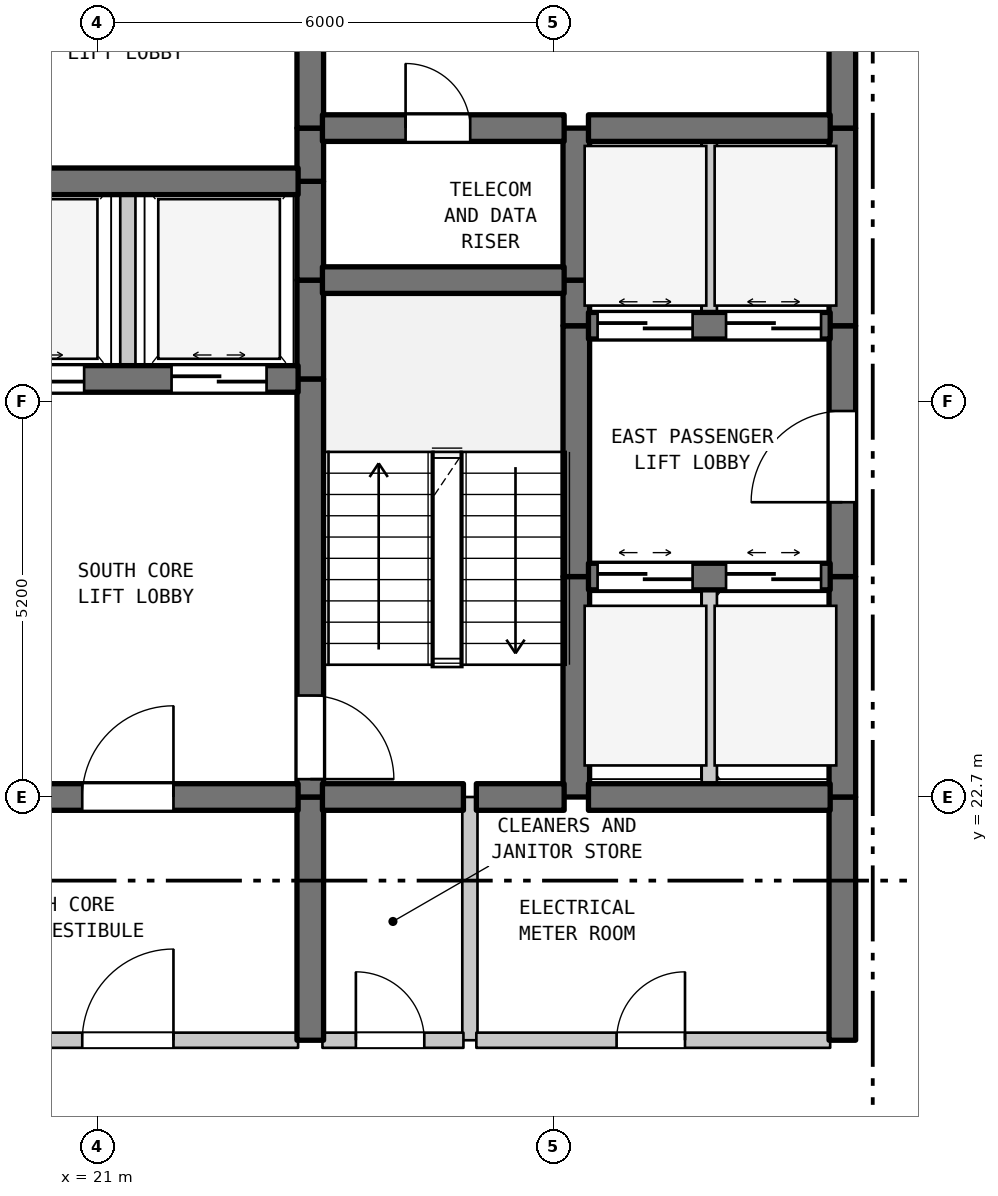
"""IFC4 building model, lengths in metres.
Left out: names, types, materials, properties, quantities, classifications, styles, units other than length and angle.
Written with IfcOpenShell. Run it as: python <this file> out.ifc"""

import sys

from ifc_helpers import new_model, si_unit, direction, frame, frame_2d, origin, place, context, subcontext, project, spatial, rectangle, extrude, element, fill, save


model = new_model("IFC4")
c1 = context("Model", 3, precision=1e-05, world=origin(), true_north=direction((0.0, 1.0)))
c2 = subcontext(c1, "Body", "Model", "MODEL_VIEW")
j1 = project(units=[si_unit("LENGTHUNIT", "METRE"), si_unit("PLANEANGLEUNIT", "RADIAN")], contexts=[c1])
p1 = place(None, origin())
s1 = spatial("IfcSite", under=j1, at=p1, CompositionType="ELEMENT")
p2 = place(p1, origin())
s2 = spatial("IfcBuilding", under=s1, at=p2, CompositionType="ELEMENT")
p3 = place(p2, frame((0.0, 0.0, 169.1)))
s3 = spatial("IfcBuildingStorey", under=s2, at=p3, CompositionType="ELEMENT", Elevation=169.1)
p4 = place(p3, frame((21.4, 28.2, 0.0), z_axis=(0.0, 0.0, 1.0), x_axis=(0.0, 1.0, 0.0)))
e1 = element("IfcWall", 1, at=p4, inside=s3, PredefinedType="STANDARD", context=c2, shape_type="SweptSolid", body=[
    extrude(rectangle(XDim=2.6, YDim=0.2, at=frame_2d((1.3, 0.0))), origin(), (0.0, 0.0, 1.0), 3.39),
])
p5 = place(p3, frame((23.8, 19.5, 0.0), z_axis=(0.0, 0.0, 1.0), x_axis=(0.0, 1.0, 0.0)))
e2 = element("IfcWall", 2, at=p5, inside=s3, PredefinedType="SHEAR", context=c2, shape_type="SweptSolid", body=[
    extrude(rectangle(XDim=3.2, YDim=0.35, at=frame_2d((1.6, 0.0))), origin(), (0.0, 0.0, 1.0), 3.39),
])
p6 = place(p3, frame((23.8, 22.7, 0.0), z_axis=(0.0, 0.0, 1.0), x_axis=(0.0, 1.0, 0.0)))
e3 = element("IfcWall", 3, at=p6, inside=s3, PredefinedType="SHEAR", context=c2, shape_type="SweptSolid", body=[
    extrude(rectangle(XDim=5.5, YDim=0.35, at=frame_2d((2.75, 0.0))), origin(), (0.0, 0.0, 1.0), 3.39),
])
p7 = place(p6, frame((0.235, 0.0, 0.0)))
e4 = element("IfcOpeningElement", 4, at=p7, cuts=e3, PredefinedType="OPENING", context=c2, shape_type="SweptSolid", body=[
    extrude(rectangle(XDim=1.1, YDim=2.15, at=frame_2d((0.55, 1.075))), frame((0.0, 0.185, 0.0), z_axis=(0.0, -1.0, 0.0), x_axis=(1.0, 0.0, 0.0)), (0.0, 0.0, 1.0), 0.37),
])
for number, where, z_axis, x_axis in (
    (5, (23.8, 28.2, 0.0), (0.0, 0.0, 1.0), (0.0, 1.0, 0.0)),
    (6, (23.8, 29.5, 0.0), (0.0, 0.0, 1.0), (0.0, 1.0, 0.0)),
):
    element("IfcWall", number, at=place(p3, frame(where, z_axis=z_axis, x_axis=x_axis)), inside=s3, PredefinedType="SHEAR", context=c2, shape_type="SweptSolid", body=[
        extrude(rectangle(XDim=1.3, YDim=0.35, at=frame_2d((0.65, 0.0))), origin(), (0.0, 0.0, 1.0), 3.39),
    ])
p8 = place(p3, frame((23.8, 30.8, 0.0), z_axis=(0.0, 0.0, 1.0), x_axis=(0.0, 1.0, 0.0)))
e7 = element("IfcWall", 7, at=p8, inside=s3, PredefinedType="SHEAR", context=c2, shape_type="SweptSolid", body=[
    extrude(rectangle(XDim=0.7, YDim=0.35, at=frame_2d((0.35, 0.0))), origin(), (0.0, 0.0, 1.0), 3.39),
])
p9 = place(p3, frame((23.8, 31.5, 0.0), z_axis=(0.0, 0.0, 1.0), x_axis=(0.0, 1.0, 0.0)))
e8 = element("IfcWall", 8, at=p9, inside=s3, PredefinedType="SHEAR", context=c2, shape_type="SweptSolid", body=[
    extrude(rectangle(XDim=3.5, YDim=0.35, at=frame_2d((1.75, 0.0))), origin(), (0.0, 0.0, 1.0), 3.39),
])
p10 = place(p9, frame((1.127, 0.0, 0.0)))
e9 = element("IfcOpeningElement", 9, at=p10, cuts=e8, PredefinedType="OPENING", context=c2, shape_type="SweptSolid", body=[
    extrude(rectangle(XDim=1.1, YDim=2.15, at=frame_2d((0.55, 1.075))), frame((0.0, 0.185, 0.0), z_axis=(0.0, -1.0, 0.0), x_axis=(1.0, 0.0, 0.0)), (0.0, 0.0, 1.0), 0.37),
])
p11 = place(p3, frame((25.9, 19.5, 0.0), z_axis=(0.0, 0.0, 1.0), x_axis=(0.0, 1.0, 0.0)))
e10 = element("IfcWall", 10, at=p11, inside=s3, PredefinedType="STANDARD", context=c2, shape_type="SweptSolid", body=[
    extrude(rectangle(XDim=3.2, YDim=0.2, at=frame_2d((1.6, 0.0))), origin(), (0.0, 0.0, 1.0), 3.39),
])
p12 = place(p3, frame((27.3, 22.7, 0.0), z_axis=(0.0, 0.0, 1.0), x_axis=(0.0, 1.0, 0.0)))
e11 = element("IfcWall", 11, at=p12, inside=s3, PredefinedType="SHEAR", context=c2, shape_type="SweptSolid", body=[
    extrude(rectangle(XDim=2.9, YDim=0.35, at=frame_2d((1.45, 0.0))), origin(), (0.0, 0.0, 1.0), 3.39),
])
p13 = place(p3, frame((27.3, 25.6, 0.0), z_axis=(0.0, 0.0, 1.0), x_axis=(0.0, 1.0, 0.0)))
e12 = element("IfcWall", 12, at=p13, inside=s3, PredefinedType="SHEAR", context=c2, shape_type="SweptSolid", body=[
    extrude(rectangle(XDim=3.3, YDim=0.35, at=frame_2d((1.65, 0.0))), origin(), (0.0, 0.0, 1.0), 3.39),
])
p14 = place(p3, frame((27.3, 28.9, 0.0), z_axis=(0.0, 0.0, 1.0), x_axis=(0.0, 1.0, 0.0)))
e13 = element("IfcWall", 13, at=p14, inside=s3, PredefinedType="SHEAR", context=c2, shape_type="SweptSolid", body=[
    extrude(rectangle(XDim=0.6, YDim=0.35, at=frame_2d((0.3, 0.0))), origin(), (0.0, 0.0, 1.0), 3.39),
])
p15 = place(p3, frame((27.3, 29.5, 0.0), z_axis=(0.0, 0.0, 1.0), x_axis=(0.0, 1.0, 0.0)))
e14 = element("IfcWall", 14, at=p15, inside=s3, PredefinedType="SHEAR", context=c2, shape_type="SweptSolid", body=[
    extrude(rectangle(XDim=2.0, YDim=0.35, at=frame_2d((1.0, 0.0))), origin(), (0.0, 0.0, 1.0), 3.39),
])
p16 = place(p3, frame((29.05, 22.7, 0.0), z_axis=(0.0, 0.0, 1.0), x_axis=(0.0, 1.0, 0.0)))
e15 = element("IfcWall", 15, at=p16, inside=s3, PredefinedType="STANDARD", context=c2, shape_type="SweptSolid", body=[
    extrude(rectangle(XDim=2.9, YDim=0.2, at=frame_2d((1.45, 0.0))), origin(), (0.0, 0.0, 1.0), 3.39),
])
p17 = place(p3, frame((29.05, 28.9, 0.0), z_axis=(0.0, 0.0, 1.0), x_axis=(0.0, 1.0, 0.0)))
e16 = element("IfcWall", 16, at=p17, inside=s3, PredefinedType="STANDARD", context=c2, shape_type="SweptSolid", body=[
    extrude(rectangle(XDim=2.6, YDim=0.2, at=frame_2d((1.3, 0.0))), origin(), (0.0, 0.0, 1.0), 3.39),
])
p18 = place(p3, frame((30.8, 19.5, 0.0), z_axis=(0.0, 0.0, 1.0), x_axis=(0.0, 1.0, 0.0)))
e17 = element("IfcWall", 17, at=p18, inside=s3, PredefinedType="SHEAR", context=c2, shape_type="SweptSolid", body=[
    extrude(rectangle(XDim=3.2, YDim=0.35, at=frame_2d((1.6, 0.0))), origin(), (0.0, 0.0, 1.0), 3.39),
])
p19 = place(p3, frame((30.8, 22.7, 0.0), z_axis=(0.0, 0.0, 1.0), x_axis=(0.0, 1.0, 0.0)))
e18 = element("IfcWall", 18, at=p19, inside=s3, PredefinedType="SHEAR", context=c2, shape_type="SweptSolid", body=[
    extrude(rectangle(XDim=2.9, YDim=0.35, at=frame_2d((1.45, 0.0))), origin(), (0.0, 0.0, 1.0), 3.39),
])
p20 = place(p3, frame((30.8, 25.6, 0.0), z_axis=(0.0, 0.0, 1.0), x_axis=(0.0, 1.0, 0.0)))
e19 = element("IfcWall", 19, at=p20, inside=s3, PredefinedType="SHEAR", context=c2, shape_type="SweptSolid", body=[
    extrude(rectangle(XDim=3.3, YDim=0.35, at=frame_2d((1.65, 0.0))), origin(), (0.0, 0.0, 1.0), 3.39),
])
p21 = place(p20, frame((0.978, 0.0, 0.0)))
e20 = element("IfcOpeningElement", 20, at=p21, cuts=e19, PredefinedType="OPENING", context=c2, shape_type="SweptSolid", body=[
    extrude(rectangle(XDim=1.2, YDim=2.2, at=frame_2d((0.6, 1.1))), frame((0.0, 0.185, 0.0), z_axis=(0.0, -1.0, 0.0), x_axis=(1.0, 0.0, 0.0)), (0.0, 0.0, 1.0), 0.37),
])
p22 = place(p3, frame((30.8, 28.9, 0.0), z_axis=(0.0, 0.0, 1.0), x_axis=(0.0, 1.0, 0.0)))
e21 = element("IfcWall", 21, at=p22, inside=s3, PredefinedType="SHEAR", context=c2, shape_type="SweptSolid", body=[
    extrude(rectangle(XDim=2.6, YDim=0.35, at=frame_2d((1.3, 0.0))), origin(), (0.0, 0.0, 1.0), 3.39),
])
p23 = place(p3, frame((30.8, 31.5, 0.0), z_axis=(0.0, 0.0, 1.0), x_axis=(0.0, 1.0, 0.0)))
e22 = element("IfcWall", 22, at=p23, inside=s3, PredefinedType="SHEAR", context=c2, shape_type="SweptSolid", body=[
    extrude(rectangle(XDim=3.5, YDim=0.35, at=frame_2d((1.75, 0.0))), origin(), (0.0, 0.0, 1.0), 3.39),
])
p24 = place(p23, frame((1.15, 0.0, 0.0)))
e23 = element("IfcOpeningElement", 23, at=p24, cuts=e22, PredefinedType="OPENING", context=c2, shape_type="SweptSolid", body=[
    extrude(rectangle(XDim=1.2, YDim=2.2, at=frame_2d((0.6, 1.1))), frame((0.0, 0.185, 0.0), z_axis=(0.0, -1.0, 0.0), x_axis=(1.0, 0.0, 0.0)), (0.0, 0.0, 1.0), 0.37),
])
p25 = place(p3, frame((19.16, 19.5, 0.0), z_axis=(0.0, 0.0, 1.0), x_axis=(1.0, 0.0, 0.0)))
e24 = element("IfcWall", 24, at=p25, inside=s3, PredefinedType="STANDARD", context=c2, shape_type="SweptSolid", body=[
    extrude(rectangle(XDim=4.48, YDim=0.2, at=frame_2d((2.24, 0.0))), origin(), (0.0, 0.0, 1.0), 3.39),
])
p26 = place(p25, frame((1.64, 0.0, 0.0)))
e25 = element("IfcOpeningElement", 25, at=p26, cuts=e24, PredefinedType="OPENING", context=c2, shape_type="SweptSolid", body=[
    extrude(rectangle(XDim=1.2, YDim=2.2, at=frame_2d((0.6, 1.1))), frame((0.0, 0.11, 0.0), z_axis=(0.0, -1.0, 0.0), x_axis=(1.0, 0.0, 0.0)), (0.0, 0.0, 1.0), 0.22),
])
p27 = place(p3, frame((23.96, 19.5, 0.0), z_axis=(0.0, 0.0, 1.0), x_axis=(1.0, 0.0, 0.0)))
e26 = element("IfcWall", 26, at=p27, inside=s3, PredefinedType="STANDARD", context=c2, shape_type="SweptSolid", body=[
    extrude(rectangle(XDim=1.855, YDim=0.2, at=frame_2d((0.927, 0.0))), origin(), (0.0, 0.0, 1.0), 3.39),
])
p28 = place(p27, frame((0.44, 0.0, 0.0)))
e27 = element("IfcOpeningElement", 27, at=p28, cuts=e26, PredefinedType="OPENING", context=c2, shape_type="SweptSolid", body=[
    extrude(rectangle(XDim=0.9, YDim=2.15, at=frame_2d((0.45, 1.075))), frame((0.0, 0.11, 0.0), z_axis=(0.0, -1.0, 0.0), x_axis=(1.0, 0.0, 0.0)), (0.0, 0.0, 1.0), 0.22),
])
p29 = place(p3, frame((25.985, 19.5, 0.0), z_axis=(0.0, 0.0, 1.0), x_axis=(1.0, 0.0, 0.0)))
e28 = element("IfcWall", 28, at=p29, inside=s3, PredefinedType="STANDARD", context=c2, shape_type="SweptSolid", body=[
    extrude(rectangle(XDim=4.655, YDim=0.2, at=frame_2d((2.327, 0.0))), origin(), (0.0, 0.0, 1.0), 3.39),
])
p30 = place(p29, frame((1.845, 0.0, 0.0)))
e29 = element("IfcOpeningElement", 29, at=p30, cuts=e28, PredefinedType="OPENING", context=c2, shape_type="SweptSolid", body=[
    extrude(rectangle(XDim=0.9, YDim=2.15, at=frame_2d((0.45, 1.075))), frame((0.0, 0.11, 0.0), z_axis=(0.0, -1.0, 0.0), x_axis=(1.0, 0.0, 0.0)), (0.0, 0.0, 1.0), 0.22),
])
p31 = place(p3, frame((19.16, 22.7, 0.0), z_axis=(0.0, 0.0, 1.0), x_axis=(1.0, 0.0, 0.0)))
e30 = element("IfcWall", 30, at=p31, inside=s3, PredefinedType="SHEAR", context=c2, shape_type="SweptSolid", body=[
    extrude(rectangle(XDim=4.48, YDim=0.35, at=frame_2d((2.24, 0.0))), origin(), (0.0, 0.0, 1.0), 3.39),
])
p32 = place(p31, frame((1.64, 0.0, 0.0)))
e31 = element("IfcOpeningElement", 31, at=p32, cuts=e30, PredefinedType="OPENING", context=c2, shape_type="SweptSolid", body=[
    extrude(rectangle(XDim=1.2, YDim=2.2, at=frame_2d((0.6, 1.1))), frame((0.0, 0.185, 0.0), z_axis=(0.0, -1.0, 0.0), x_axis=(1.0, 0.0, 0.0)), (0.0, 0.0, 1.0), 0.37),
])
p33 = place(p3, frame((23.96, 22.7, 0.0), z_axis=(0.0, 0.0, 1.0), x_axis=(1.0, 0.0, 0.0)))
e32 = element("IfcWall", 32, at=p33, inside=s3, PredefinedType="SHEAR", context=c2, shape_type="SweptSolid", body=[
    extrude(rectangle(XDim=1.855, YDim=0.35, at=frame_2d((0.927, 0.0))), origin(), (0.0, 0.0, 1.0), 3.39),
])
p34 = place(p3, frame((25.985, 22.7, 0.0), z_axis=(0.0, 0.0, 1.0), x_axis=(1.0, 0.0, 0.0)))
e33 = element("IfcWall", 33, at=p34, inside=s3, PredefinedType="SHEAR", context=c2, shape_type="SweptSolid", body=[
    extrude(rectangle(XDim=1.155, YDim=0.35, at=frame_2d((0.577, 0.0))), origin(), (0.0, 0.0, 1.0), 3.39),
])
p35 = place(p3, frame((27.46, 22.7, 0.0), z_axis=(0.0, 0.0, 1.0), x_axis=(1.0, 0.0, 0.0)))
e34 = element("IfcWall", 34, at=p35, inside=s3, PredefinedType="SHEAR", context=c2, shape_type="SweptSolid", body=[
    extrude(rectangle(XDim=3.18, YDim=0.35, at=frame_2d((1.59, 0.0))), origin(), (0.0, 0.0, 1.0), 3.39),
])
p36 = place(p3, frame((27.46, 25.6, 0.0), z_axis=(0.0, 0.0, 1.0), x_axis=(1.0, 0.0, 0.0)))
e35 = element("IfcWall", 35, at=p36, inside=s3, PredefinedType="SHEAR", context=c2, shape_type="SweptSolid", body=[
    extrude(rectangle(XDim=3.18, YDim=0.35, at=frame_2d((1.59, 0.0))), origin(), (0.0, 0.0, 1.0), 3.39),
])
p37 = place(p36, frame((0.12, 0.0, 0.0)))
e36 = element("IfcOpeningElement", 36, at=p37, cuts=e35, PredefinedType="OPENING", context=c2, shape_type="SweptSolid", body=[
    extrude(rectangle(XDim=1.25, YDim=2.2, at=frame_2d((0.625, 1.1))), frame((0.0, 0.185, 0.0), z_axis=(0.0, -1.0, 0.0), x_axis=(1.0, 0.0, 0.0)), (0.0, 0.0, 1.0), 0.37),
])
p38 = place(p36, frame((1.81, 0.0, 0.0)))
e37 = element("IfcOpeningElement", 37, at=p38, cuts=e35, PredefinedType="OPENING", context=c2, shape_type="SweptSolid", body=[
    extrude(rectangle(XDim=1.25, YDim=2.2, at=frame_2d((0.625, 1.1))), frame((0.0, 0.185, 0.0), z_axis=(0.0, -1.0, 0.0), x_axis=(1.0, 0.0, 0.0)), (0.0, 0.0, 1.0), 0.37),
])
p39 = place(p3, frame((19.16, 28.2, 0.0), z_axis=(0.0, 0.0, 1.0), x_axis=(1.0, 0.0, 0.0)))
e38 = element("IfcWall", 38, at=p39, inside=s3, PredefinedType="SHEAR", context=c2, shape_type="SweptSolid", body=[
    extrude(rectangle(XDim=4.48, YDim=0.35, at=frame_2d((2.24, 0.0))), origin(), (0.0, 0.0, 1.0), 3.39),
])
p40 = place(p39, frame((0.415, 0.0, 0.0)))
e39 = element("IfcOpeningElement", 39, at=p40, cuts=e38, PredefinedType="OPENING", context=c2, shape_type="SweptSolid", body=[
    extrude(rectangle(XDim=1.25, YDim=2.2, at=frame_2d((0.625, 1.1))), frame((0.0, 0.185, 0.0), z_axis=(0.0, -1.0, 0.0), x_axis=(1.0, 0.0, 0.0)), (0.0, 0.0, 1.0), 0.37),
])
p41 = place(p39, frame((2.815, 0.0, 0.0)))
e40 = element("IfcOpeningElement", 40, at=p41, cuts=e38, PredefinedType="OPENING", context=c2, shape_type="SweptSolid", body=[
    extrude(rectangle(XDim=1.25, YDim=2.2, at=frame_2d((0.625, 1.1))), frame((0.0, 0.185, 0.0), z_axis=(0.0, -1.0, 0.0), x_axis=(1.0, 0.0, 0.0)), (0.0, 0.0, 1.0), 0.37),
])
p42 = place(p3, frame((27.46, 28.9, 0.0), z_axis=(0.0, 0.0, 1.0), x_axis=(1.0, 0.0, 0.0)))
e41 = element("IfcWall", 41, at=p42, inside=s3, PredefinedType="SHEAR", context=c2, shape_type="SweptSolid", body=[
    extrude(rectangle(XDim=3.18, YDim=0.35, at=frame_2d((1.59, 0.0))), origin(), (0.0, 0.0, 1.0), 3.39),
])
p43 = place(p42, frame((0.12, 0.0, 0.0)))
e42 = element("IfcOpeningElement", 42, at=p43, cuts=e41, PredefinedType="OPENING", context=c2, shape_type="SweptSolid", body=[
    extrude(rectangle(XDim=1.25, YDim=2.2, at=frame_2d((0.625, 1.1))), frame((0.0, 0.185, 0.0), z_axis=(0.0, -1.0, 0.0), x_axis=(1.0, 0.0, 0.0)), (0.0, 0.0, 1.0), 0.37),
])
p44 = place(p42, frame((1.81, 0.0, 0.0)))
e43 = element("IfcOpeningElement", 43, at=p44, cuts=e41, PredefinedType="OPENING", context=c2, shape_type="SweptSolid", body=[
    extrude(rectangle(XDim=1.25, YDim=2.2, at=frame_2d((0.625, 1.1))), frame((0.0, 0.185, 0.0), z_axis=(0.0, -1.0, 0.0), x_axis=(1.0, 0.0, 0.0)), (0.0, 0.0, 1.0), 0.37),
])
p45 = place(p3, frame((23.96, 29.5, 0.0), z_axis=(0.0, 0.0, 1.0), x_axis=(1.0, 0.0, 0.0)))
e44 = element("IfcWall", 44, at=p45, inside=s3, PredefinedType="SHEAR", context=c2, shape_type="SweptSolid", body=[
    extrude(rectangle(XDim=3.18, YDim=0.35, at=frame_2d((1.59, 0.0))), origin(), (0.0, 0.0, 1.0), 3.39),
])
p46 = place(p3, frame((19.16, 30.8, 0.0), z_axis=(0.0, 0.0, 1.0), x_axis=(1.0, 0.0, 0.0)))
e45 = element("IfcWall", 45, at=p46, inside=s3, PredefinedType="SHEAR", context=c2, shape_type="SweptSolid", body=[
    extrude(rectangle(XDim=4.48, YDim=0.35, at=frame_2d((2.24, 0.0))), origin(), (0.0, 0.0, 1.0), 3.39),
])
p47 = place(p3, frame((23.96, 31.5, 0.0), z_axis=(0.0, 0.0, 1.0), x_axis=(1.0, 0.0, 0.0)))
e46 = element("IfcWall", 46, at=p47, inside=s3, PredefinedType="SHEAR", context=c2, shape_type="SweptSolid", body=[
    extrude(rectangle(XDim=3.18, YDim=0.35, at=frame_2d((1.59, 0.0))), origin(), (0.0, 0.0, 1.0), 3.39),
])
p48 = place(p47, frame((1.094, 0.0, 0.0)))
e47 = element("IfcOpeningElement", 47, at=p48, cuts=e46, PredefinedType="OPENING", context=c2, shape_type="SweptSolid", body=[
    extrude(rectangle(XDim=0.85, YDim=2.1, at=frame_2d((0.425, 1.05))), frame((0.0, 0.185, 0.0), z_axis=(0.0, -1.0, 0.0), x_axis=(1.0, 0.0, 0.0)), (0.0, 0.0, 1.0), 0.37),
])
p49 = place(p3, frame((27.46, 31.5, 0.0), z_axis=(0.0, 0.0, 1.0), x_axis=(1.0, 0.0, 0.0)))
e48 = element("IfcWall", 48, at=p49, inside=s3, PredefinedType="SHEAR", context=c2, shape_type="SweptSolid", body=[
    extrude(rectangle(XDim=3.18, YDim=0.35, at=frame_2d((1.59, 0.0))), origin(), (0.0, 0.0, 1.0), 3.39),
])
p50 = place(p7, frame((1.1, 0.0, 0.0), z_axis=(0.0, 0.0, 1.0), x_axis=(-1.0, 0.0, 0.0)))
e49 = element("IfcDoor", 49, at=p50, inside=s3, OperationType="SINGLE_SWING_LEFT", PredefinedType="DOOR", context=c2, shape_type="SweptSolid", body=[
    extrude(rectangle(XDim=1.1, YDim=2.15, at=frame_2d((0.55, 1.075))), frame((0.0, 0.025, 0.0), z_axis=(0.0, -1.0, 0.0), x_axis=(1.0, 0.0, 0.0)), (0.0, 0.0, 1.0), 0.05),
])
fill(e4, e49)
p51 = place(p21, origin())
e50 = element("IfcDoor", 50, at=p51, inside=s3, OperationType="SINGLE_SWING_LEFT", PredefinedType="DOOR", context=c2, shape_type="SweptSolid", body=[
    extrude(rectangle(XDim=1.2, YDim=2.2, at=frame_2d((0.6, 1.1))), frame((0.0, 0.025, 0.0), z_axis=(0.0, -1.0, 0.0), x_axis=(1.0, 0.0, 0.0)), (0.0, 0.0, 1.0), 0.05),
])
fill(e20, e50)
p52 = place(p26, origin())
e51 = element("IfcDoor", 51, at=p52, inside=s3, OperationType="SINGLE_SWING_RIGHT", PredefinedType="DOOR", context=c2, shape_type="SweptSolid", body=[
    extrude(rectangle(XDim=1.2, YDim=2.2, at=frame_2d((0.6, 1.1))), frame((0.0, 0.025, 0.0), z_axis=(0.0, -1.0, 0.0), x_axis=(1.0, 0.0, 0.0)), (0.0, 0.0, 1.0), 0.05),
])
fill(e25, e51)
p53 = place(p28, origin())
e52 = element("IfcDoor", 52, at=p53, inside=s3, OperationType="SINGLE_SWING_LEFT", PredefinedType="DOOR", context=c2, shape_type="SweptSolid", body=[
    extrude(rectangle(XDim=0.9, YDim=2.15, at=frame_2d((0.45, 1.075))), frame((0.0, 0.025, 0.0), z_axis=(0.0, -1.0, 0.0), x_axis=(1.0, 0.0, 0.0)), (0.0, 0.0, 1.0), 0.05),
])
fill(e27, e52)
p54 = place(p30, origin())
e53 = element("IfcDoor", 53, at=p54, inside=s3, OperationType="SINGLE_SWING_RIGHT", PredefinedType="DOOR", context=c2, shape_type="SweptSolid", body=[
    extrude(rectangle(XDim=0.9, YDim=2.15, at=frame_2d((0.45, 1.075))), frame((0.0, 0.025, 0.0), z_axis=(0.0, -1.0, 0.0), x_axis=(1.0, 0.0, 0.0)), (0.0, 0.0, 1.0), 0.05),
])
fill(e29, e53)
p55 = place(p32, origin())
e54 = element("IfcDoor", 54, at=p55, inside=s3, OperationType="SINGLE_SWING_RIGHT", PredefinedType="DOOR", context=c2, shape_type="SweptSolid", body=[
    extrude(rectangle(XDim=1.2, YDim=2.2, at=frame_2d((0.6, 1.1))), frame((0.0, 0.025, 0.0), z_axis=(0.0, -1.0, 0.0), x_axis=(1.0, 0.0, 0.0)), (0.0, 0.0, 1.0), 0.05),
])
fill(e31, e54)
p56 = place(p37, origin())
e55 = element("IfcDoor", 55, at=p56, inside=s3, OperationType="DOUBLE_DOOR_SLIDING", PredefinedType="DOOR", context=c2, shape_type="SweptSolid", body=[
    extrude(rectangle(XDim=1.25, YDim=2.2, at=frame_2d((0.625, 1.1))), frame((0.0, 0.025, 0.0), z_axis=(0.0, -1.0, 0.0), x_axis=(1.0, 0.0, 0.0)), (0.0, 0.0, 1.0), 0.05),
])
fill(e36, e55)
p57 = place(p38, origin())
e56 = element("IfcDoor", 56, at=p57, inside=s3, OperationType="DOUBLE_DOOR_SLIDING", PredefinedType="DOOR", context=c2, shape_type="SweptSolid", body=[
    extrude(rectangle(XDim=1.25, YDim=2.2, at=frame_2d((0.625, 1.1))), frame((0.0, 0.025, 0.0), z_axis=(0.0, -1.0, 0.0), x_axis=(1.0, 0.0, 0.0)), (0.0, 0.0, 1.0), 0.05),
])
fill(e37, e56)
p58 = place(p40, origin())
e57 = element("IfcDoor", 57, at=p58, inside=s3, OperationType="DOUBLE_DOOR_SLIDING", PredefinedType="DOOR", context=c2, shape_type="SweptSolid", body=[
    extrude(rectangle(XDim=1.25, YDim=2.2, at=frame_2d((0.625, 1.1))), frame((0.0, 0.025, 0.0), z_axis=(0.0, -1.0, 0.0), x_axis=(1.0, 0.0, 0.0)), (0.0, 0.0, 1.0), 0.05),
])
fill(e39, e57)
p59 = place(p41, origin())
e58 = element("IfcDoor", 58, at=p59, inside=s3, OperationType="DOUBLE_DOOR_SLIDING", PredefinedType="DOOR", context=c2, shape_type="SweptSolid", body=[
    extrude(rectangle(XDim=1.25, YDim=2.2, at=frame_2d((0.625, 1.1))), frame((0.0, 0.025, 0.0), z_axis=(0.0, -1.0, 0.0), x_axis=(1.0, 0.0, 0.0)), (0.0, 0.0, 1.0), 0.05),
])
fill(e40, e58)
p60 = place(p43, origin())
e59 = element("IfcDoor", 59, at=p60, inside=s3, OperationType="DOUBLE_DOOR_SLIDING", PredefinedType="DOOR", context=c2, shape_type="SweptSolid", body=[
    extrude(rectangle(XDim=1.25, YDim=2.2, at=frame_2d((0.625, 1.1))), frame((0.0, 0.025, 0.0), z_axis=(0.0, -1.0, 0.0), x_axis=(1.0, 0.0, 0.0)), (0.0, 0.0, 1.0), 0.05),
])
fill(e42, e59)
p61 = place(p44, origin())
e60 = element("IfcDoor", 60, at=p61, inside=s3, OperationType="DOUBLE_DOOR_SLIDING", PredefinedType="DOOR", context=c2, shape_type="SweptSolid", body=[
    extrude(rectangle(XDim=1.25, YDim=2.2, at=frame_2d((0.625, 1.1))), frame((0.0, 0.025, 0.0), z_axis=(0.0, -1.0, 0.0), x_axis=(1.0, 0.0, 0.0)), (0.0, 0.0, 1.0), 0.05),
])
fill(e43, e60)
p62 = place(p48, origin())
e61 = element("IfcDoor", 61, at=p62, inside=s3, OperationType="SINGLE_SWING_LEFT", PredefinedType="DOOR", context=c2, shape_type="SweptSolid", body=[
    extrude(rectangle(XDim=0.85, YDim=2.1, at=frame_2d((0.425, 1.05))), frame((0.0, 0.025, 0.0), z_axis=(0.0, -1.0, 0.0), x_axis=(1.0, 0.0, 0.0)), (0.0, 0.0, 1.0), 0.05),
])
fill(e47, e61)
save(model, sys.argv[1])
